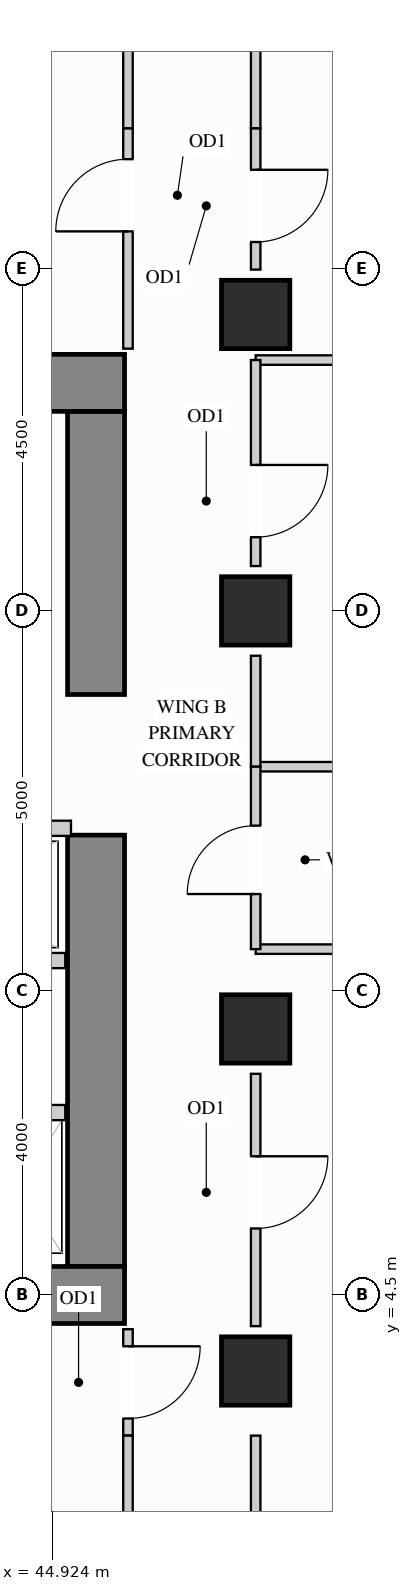
"""IFC4 building model, lengths in metres.
Left out: names, types, materials, properties, quantities, classifications, styles, units other than length and angle.
Written with IfcOpenShell. Run it as: python <this file> out.ifc"""

import sys

from ifc_helpers import new_model, si_unit, direction, frame, frame_2d, origin, origin_2d, place, context, subcontext, project, spatial, rectangle, extrude, source, transform, mapped, element, fill, save


model = new_model("IFC4")
c1 = context("Model", 3, precision=1e-05, world=origin(), true_north=direction((0.0, 1.0)))
c2 = subcontext(c1, "Body", "Model", "MODEL_VIEW")
j1 = project(units=[si_unit("LENGTHUNIT", "METRE"), si_unit("PLANEANGLEUNIT", "RADIAN")], contexts=[c1])
p1 = place(None, origin())
s1 = spatial("IfcSite", under=j1, at=p1, CompositionType="ELEMENT")
p2 = place(p1, origin())
s2 = spatial("IfcBuilding", under=s1, at=p2, CompositionType="ELEMENT")
p3 = place(p2, frame((0.0, 0.0, 81.0)))
s3 = spatial("IfcBuildingStorey", under=s2, at=p3, CompositionType="ELEMENT", Elevation=81.0)
m1 = source(origin(), c2, "Body", "SweptSolid", [
    extrude(rectangle(XDim=0.9, YDim=0.9, at=origin_2d()), origin(), (0.0, 0.0, 1.0), 3.38),
])
for number, where, z_axis, x_axis in (
    (1, (47.6, 13.5, 0.0), (0.0, 0.0, 1.0), (1.0, 0.0, 0.0)),
    (2, (47.6, 3.5, 0.0), (0.0, 0.0, 1.0), (1.0, 0.0, 0.0)),
    (3, (47.6, 8.0, 0.0), (0.0, 0.0, 1.0), (1.0, 0.0, 0.0)),
    (4, (47.6, 17.4, 0.0), (0.0, 0.0, 1.0), (1.0, 0.0, 0.0)),
):
    element("IfcColumn", number, at=place(p3, frame(where, z_axis=z_axis, x_axis=x_axis)), inside=s3, PredefinedType="COLUMN", context=c2, shape_type="MappedRepresentation", body=[
        mapped(m1, transform((0.0, 0.0, 0.0), x_axis=(1.0, 0.0, 0.0), y_axis=(0.0, 1.0, 0.0), z_axis=(0.0, 0.0, 1.0))),
    ])
m2 = source(origin(), c2, "Body", "SweptSolid", [
    extrude(rectangle(XDim=5.675, YDim=0.75, at=frame_2d((2.837, 0.0))), origin(), (0.0, 0.0, 1.0), 3.38),
])
p4 = place(p3, frame((45.5, 4.875, 0.0), z_axis=(0.0, 0.0, 1.0), x_axis=(0.0, 1.0, 0.0)))
e5 = element("IfcWall", 5, at=p4, inside=s3, PredefinedType="SHEAR", context=c2, shape_type="MappedRepresentation", body=[
    mapped(m2, transform((0.0, 0.0, 0.0), x_axis=(1.0, 0.0, 0.0), y_axis=(0.0, 1.0, 0.0), z_axis=(0.0, 0.0, 1.0))),
])
m3 = source(origin(), c2, "Body", "SweptSolid", [
    extrude(rectangle(XDim=3.725, YDim=0.75, at=frame_2d((1.863, 0.0))), origin(), (0.0, 0.0, 1.0), 3.38),
])
p5 = place(p3, frame((45.5, 12.4, 0.0), z_axis=(0.0, 0.0, 1.0), x_axis=(0.0, 1.0, 0.0)))
e6 = element("IfcWall", 6, at=p5, inside=s3, PredefinedType="SHEAR", context=c2, shape_type="MappedRepresentation", body=[
    mapped(m3, transform((0.0, 0.0, 0.0), x_axis=(1.0, 0.0, 0.0), y_axis=(0.0, 1.0, 0.0), z_axis=(0.0, 0.0, 1.0))),
])
m4 = source(origin(), c2, "Body", "SweptSolid", [
    extrude(rectangle(XDim=10.25, YDim=0.75, at=frame_2d((5.125, 0.0))), origin(), (0.0, 0.0, 1.0), 3.38),
])
for number, where, z_axis, x_axis in (
    (7, (35.625, 16.5, 0.0), (0.0, 0.0, 1.0), (1.0, 0.0, 0.0)),
    (8, (35.625, 4.5, 0.0), (0.0, 0.0, 1.0), (1.0, 0.0, 0.0)),
):
    element("IfcWall", number, at=place(p3, frame(where, z_axis=z_axis, x_axis=x_axis)), inside=s3, PredefinedType="SHEAR", context=c2, shape_type="MappedRepresentation", body=[
        mapped(m4, transform((0.0, 0.0, 0.0), x_axis=(1.0, 0.0, 0.0), y_axis=(0.0, 1.0, 0.0), z_axis=(0.0, 0.0, 1.0))),
    ])
m5 = source(origin(), c2, "Body", "SweptSolid", [
    extrude(rectangle(XDim=8.048, YDim=0.125, at=frame_2d((4.024, 0.0))), origin(), (0.0, 0.0, 1.0), 3.365),
])
for number, where, z_axis, x_axis in (
    (9, (47.6, 11.45, 0.0), (0.0, 0.0, 1.0), (1.0, 0.0, 0.0)),
    (10, (47.6, 16.8, 0.0), (0.0, 0.0, 1.0), (1.0, 0.0, 0.0)),
    (11, (47.6, 9.05, 0.0), (0.0, 0.0, 1.0), (1.0, 0.0, 0.0)),
):
    element("IfcWall", number, at=place(p3, frame(where, z_axis=z_axis, x_axis=x_axis)), inside=s3, PredefinedType="PARTITIONING", context=c2, shape_type="MappedRepresentation", body=[
        mapped(m5, transform((0.0, 0.0, 0.0), x_axis=(1.0, 0.0, 0.0), y_axis=(0.0, 1.0, 0.0), z_axis=(0.0, 0.0, 1.0))),
    ])
p6 = place(p3, frame((47.6, 4.09, 0.0), z_axis=(0.0, 0.0, 1.0), x_axis=(0.0, 1.0, 0.0)))
e12 = element("IfcWall", 12, at=p6, inside=s3, PredefinedType="PARTITIONING", context=c2, shape_type="SweptSolid", body=[
    extrude(rectangle(XDim=3.32, YDim=0.125, at=frame_2d((1.66, 0.0))), origin(), (0.0, 0.0, 1.0), 2.677),
])
p7 = place(p6, frame((1.285, 0.0, 0.0)))
e13 = element("IfcOpeningElement", 13, at=p7, cuts=e12, PredefinedType="OPENING", context=c2, shape_type="SweptSolid", body=[
    extrude(rectangle(XDim=0.95, YDim=2.15, at=frame_2d((0.475, 1.075))), frame((0.0, 0.073, 0.0), z_axis=(0.0, -1.0, 0.0), x_axis=(1.0, 0.0, 0.0)), (0.0, 0.0, 1.0), 0.145),
])
m6 = source(origin(), c2, "Body", "SweptSolid", [
    extrude(rectangle(XDim=1.46, YDim=0.125, at=frame_2d((0.73, 0.0))), origin(), (0.0, 0.0, 1.0), 2.677),
])
for number, where, z_axis, x_axis in (
    (14, (47.6, 1.19, 0.0), (0.0, 0.0, 1.0), (0.0, 1.0, 0.0)),
    (15, (47.6, 11.45, 0.0), (0.0, 0.0, 1.0), (0.0, 1.0, 0.0)),
):
    element("IfcWall", number, at=place(p3, frame(where, z_axis=z_axis, x_axis=x_axis)), inside=s3, PredefinedType="PARTITIONING", context=c2, shape_type="MappedRepresentation", body=[
        mapped(m6, transform((0.0, 0.0, 0.0), x_axis=(1.0, 0.0, 0.0), y_axis=(0.0, 1.0, 0.0), z_axis=(0.0, 0.0, 1.0))),
    ])
p8 = place(p3, frame((47.6, 14.09, 0.0), z_axis=(0.0, 0.0, 1.0), x_axis=(0.0, 1.0, 0.0)))
e16 = element("IfcWall", 16, at=p8, inside=s3, PredefinedType="PARTITIONING", context=c2, shape_type="SweptSolid", body=[
    extrude(rectangle(XDim=2.71, YDim=0.125, at=frame_2d((1.355, 0.0))), origin(), (0.0, 0.0, 1.0), 2.677),
])
p9 = place(p8, frame((0.38, 0.0, 0.0)))
e17 = element("IfcOpeningElement", 17, at=p9, cuts=e16, PredefinedType="OPENING", context=c2, shape_type="SweptSolid", body=[
    extrude(rectangle(XDim=0.95, YDim=2.15, at=frame_2d((0.475, 1.075))), frame((0.0, 0.073, 0.0), z_axis=(0.0, -1.0, 0.0), x_axis=(1.0, 0.0, 0.0)), (0.0, 0.0, 1.0), 0.145),
])
p10 = place(p3, frame((47.6, 17.99, 0.0), z_axis=(0.0, 0.0, 1.0), x_axis=(0.0, 1.0, 0.0)))
e18 = element("IfcWall", 18, at=p10, inside=s3, PredefinedType="PARTITIONING", context=c2, shape_type="SweptSolid", body=[
    extrude(rectangle(XDim=1.86, YDim=0.125, at=frame_2d((0.93, 0.0))), origin(), (0.0, 0.0, 1.0), 2.677),
])
p11 = place(p10, frame((0.363, 0.0, 0.0)))
e19 = element("IfcOpeningElement", 19, at=p11, cuts=e18, PredefinedType="OPENING", context=c2, shape_type="SweptSolid", body=[
    extrude(rectangle(XDim=0.95, YDim=2.15, at=frame_2d((0.475, 1.075))), frame((0.0, 0.073, 0.0), z_axis=(0.0, -1.0, 0.0), x_axis=(1.0, 0.0, 0.0)), (0.0, 0.0, 1.0), 0.145),
])
p12 = place(p3, frame((47.6, 19.85, 0.0), z_axis=(0.0, 0.0, 1.0), x_axis=(0.0, 1.0, 0.0)))
e20 = element("IfcWall", 20, at=p12, inside=s3, PredefinedType="PARTITIONING", context=c2, shape_type="MappedRepresentation", body=[
    mapped(m6, transform((0.0, 0.0, 0.0), x_axis=(1.0, 0.0, 0.0), y_axis=(0.0, 1.0, 0.0), z_axis=(0.0, 0.0, 1.0))),
])
p13 = place(p3, frame((47.6, 9.05, 0.0), z_axis=(0.0, 0.0, 1.0), x_axis=(0.0, 1.0, 0.0)))
e21 = element("IfcWall", 21, at=p13, inside=s3, PredefinedType="PARTITIONING", context=c2, shape_type="SweptSolid", body=[
    extrude(rectangle(XDim=2.4, YDim=0.125, at=frame_2d((1.2, 0.0))), origin(), (0.0, 0.0, 1.0), 2.677),
])
p14 = place(p13, frame((0.725, 0.0, 0.0)))
e22 = element("IfcOpeningElement", 22, at=p14, cuts=e21, PredefinedType="OPENING", context=c2, shape_type="SweptSolid", body=[
    extrude(rectangle(XDim=0.9, YDim=2.15, at=frame_2d((0.45, 1.075))), frame((0.0, 0.073, 0.0), z_axis=(0.0, -1.0, 0.0), x_axis=(1.0, 0.0, 0.0)), (0.0, 0.0, 1.0), 0.145),
])
p15 = place(p3, frame((45.92, 16.95, 0.0), z_axis=(0.0, 0.0, 1.0), x_axis=(0.0, 1.0, 0.0)))
e23 = element("IfcWall", 23, at=p15, inside=s3, PredefinedType="PARTITIONING", context=c2, shape_type="SweptSolid", body=[
    extrude(rectangle(XDim=2.9, YDim=0.125, at=frame_2d((1.45, 0.0))), origin(), (0.0, 0.0, 1.0), 3.365),
])
p16 = place(p15, frame((1.543, 0.0, 0.0)))
e24 = element("IfcOpeningElement", 24, at=p16, cuts=e23, PredefinedType="OPENING", context=c2, shape_type="SweptSolid", body=[
    extrude(rectangle(XDim=0.95, YDim=2.15, at=frame_2d((0.475, 1.075))), frame((0.0, 0.073, 0.0), z_axis=(0.0, -1.0, 0.0), x_axis=(1.0, 0.0, 0.0)), (0.0, 0.0, 1.0), 0.145),
])
m7 = source(origin(), c2, "Body", "SweptSolid", [
    extrude(rectangle(XDim=2.298, YDim=0.125, at=frame_2d((1.149, 0.0))), origin(), (0.0, 0.0, 1.0), 3.365),
])
p17 = place(p3, frame((45.92, 19.85, 0.0), z_axis=(0.0, 0.0, 1.0), x_axis=(0.0, 1.0, 0.0)))
e25 = element("IfcWall", 25, at=p17, inside=s3, PredefinedType="PARTITIONING", context=c2, shape_type="MappedRepresentation", body=[
    mapped(m7, transform((0.0, 0.0, 0.0), x_axis=(1.0, 0.0, 0.0), y_axis=(0.0, 1.0, 0.0), z_axis=(0.0, 0.0, 1.0))),
])
p18 = place(p3, frame((45.92, 2.65, 0.0), z_axis=(0.0, 0.0, 1.0), x_axis=(0.0, 1.0, 0.0)))
e26 = element("IfcWall", 26, at=p18, inside=s3, PredefinedType="PARTITIONING", context=c2, shape_type="SweptSolid", body=[
    extrude(rectangle(XDim=1.4, YDim=0.125, at=frame_2d((0.7, 0.0))), origin(), (0.0, 0.0, 1.0), 3.365),
])
p19 = place(p18, frame((0.225, 0.0, 0.0)))
e27 = element("IfcOpeningElement", 27, at=p19, cuts=e26, PredefinedType="OPENING", context=c2, shape_type="SweptSolid", body=[
    extrude(rectangle(XDim=0.95, YDim=2.15, at=frame_2d((0.475, 1.075))), frame((0.0, 0.073, 0.0), z_axis=(0.0, -1.0, 0.0), x_axis=(1.0, 0.0, 0.0)), (0.0, 0.0, 1.0), 0.145),
])
p20 = place(p3, frame((45.92, 0.352, 0.0), z_axis=(0.0, 0.0, 1.0), x_axis=(0.0, 1.0, 0.0)))
e28 = element("IfcWall", 28, at=p20, inside=s3, PredefinedType="PARTITIONING", context=c2, shape_type="MappedRepresentation", body=[
    mapped(m7, transform((0.0, 0.0, 0.0), x_axis=(1.0, 0.0, 0.0), y_axis=(0.0, 1.0, 0.0), z_axis=(0.0, 0.0, 1.0))),
])
m8 = source(origin(), c2, "Body", "SweptSolid", [
    extrude(rectangle(XDim=1.245, YDim=0.2, at=frame_2d((0.623, 0.0))), origin(), (0.0, 0.0, 1.0), 3.365),
])
p21 = place(p3, frame((43.85, 6.9, 0.0), z_axis=(0.0, 0.0, 1.0), x_axis=(1.0, 0.0, 0.0)))
e29 = element("IfcWall", 29, at=p21, inside=s3, PredefinedType="PARTITIONING", context=c2, shape_type="MappedRepresentation", body=[
    mapped(m8, transform((0.0, 0.0, 0.0), x_axis=(1.0, 0.0, 0.0), y_axis=(0.0, 1.0, 0.0), z_axis=(0.0, 0.0, 1.0))),
])
m9 = source(origin(), c2, "Body", "SweptSolid", [
    extrude(rectangle(XDim=3.49, YDim=0.2, at=frame_2d((1.745, 0.0))), origin(), (0.0, 0.0, 1.0), 3.365),
])
p22 = place(p3, frame((41.68, 10.64, 0.0), z_axis=(0.0, 0.0, 1.0), x_axis=(1.0, 0.0, 0.0)))
e30 = element("IfcWall", 30, at=p22, inside=s3, PredefinedType="PARTITIONING", context=c2, shape_type="MappedRepresentation", body=[
    mapped(m9, transform((0.0, 0.0, 0.0), x_axis=(1.0, 0.0, 0.0), y_axis=(0.0, 1.0, 0.0), z_axis=(0.0, 0.0, 1.0))),
])
m10 = source(origin(), c2, "Body", "SweptSolid", [
    extrude(rectangle(XDim=3.415, YDim=0.2, at=frame_2d((1.708, 0.0))), origin(), (0.0, 0.0, 1.0), 3.365),
])
p23 = place(p3, frame((41.68, 8.9, 0.0), z_axis=(0.0, 0.0, 1.0), x_axis=(1.0, 0.0, 0.0)))
e31 = element("IfcWall", 31, at=p23, inside=s3, PredefinedType="PARTITIONING", context=c2, shape_type="MappedRepresentation", body=[
    mapped(m10, transform((0.0, 0.0, 0.0), x_axis=(1.0, 0.0, 0.0), y_axis=(0.0, 1.0, 0.0), z_axis=(0.0, 0.0, 1.0))),
])
m11 = source(origin(), c2, "Body", "SweptSolid", [
    extrude(rectangle(XDim=0.95, YDim=2.15, at=frame_2d((0.475, 1.075))), frame((0.0, 0.025, 0.0), z_axis=(0.0, -1.0, 0.0), x_axis=(1.0, 0.0, 0.0)), (0.0, 0.0, 1.0), 0.05),
])
p24 = place(p16, origin())
e32 = element("IfcDoor", 32, at=p24, inside=s3, OperationType="SINGLE_SWING_LEFT", PredefinedType="DOOR", context=c2, shape_type="MappedRepresentation", body=[
    mapped(m11, transform((0.0, 0.0, 0.0), x_axis=(1.0, 0.0, 0.0), y_axis=(0.0, 1.0, 0.0), z_axis=(0.0, 0.0, 1.0))),
])
fill(e24, e32)
p25 = place(p19, origin())
e33 = element("IfcDoor", 33, at=p25, inside=s3, OperationType="SINGLE_SWING_RIGHT", PredefinedType="DOOR", context=c2, shape_type="MappedRepresentation", body=[
    mapped(m11, transform((0.0, 0.0, 0.0), x_axis=(1.0, 0.0, 0.0), y_axis=(0.0, 1.0, 0.0), z_axis=(0.0, 0.0, 1.0))),
])
fill(e27, e33)
p26 = place(p7, origin())
e34 = element("IfcDoor", 34, at=p26, inside=s3, OperationType="SINGLE_SWING_RIGHT", PredefinedType="DOOR", context=c2, shape_type="MappedRepresentation", body=[
    mapped(m11, transform((0.0, 0.0, 0.0), x_axis=(1.0, 0.0, 0.0), y_axis=(0.0, 1.0, 0.0), z_axis=(0.0, 0.0, 1.0))),
])
fill(e13, e34)
p27 = place(p9, origin())
e35 = element("IfcDoor", 35, at=p27, inside=s3, OperationType="SINGLE_SWING_RIGHT", PredefinedType="DOOR", context=c2, shape_type="MappedRepresentation", body=[
    mapped(m11, transform((0.0, 0.0, 0.0), x_axis=(1.0, 0.0, 0.0), y_axis=(0.0, 1.0, 0.0), z_axis=(0.0, 0.0, 1.0))),
])
fill(e17, e35)
p28 = place(p11, origin())
e36 = element("IfcDoor", 36, at=p28, inside=s3, OperationType="SINGLE_SWING_RIGHT", PredefinedType="DOOR", context=c2, shape_type="MappedRepresentation", body=[
    mapped(m11, transform((0.0, 0.0, 0.0), x_axis=(1.0, 0.0, 0.0), y_axis=(0.0, 1.0, 0.0), z_axis=(0.0, 0.0, 1.0))),
])
fill(e19, e36)
m12 = source(origin(), c2, "Body", "SweptSolid", [
    extrude(rectangle(XDim=0.9, YDim=2.15, at=frame_2d((0.45, 1.075))), frame((0.0, 0.025, 0.0), z_axis=(0.0, -1.0, 0.0), x_axis=(1.0, 0.0, 0.0)), (0.0, 0.0, 1.0), 0.05),
])
p29 = place(p14, origin())
e37 = element("IfcDoor", 37, at=p29, inside=s3, OperationType="SINGLE_SWING_LEFT", PredefinedType="DOOR", context=c2, shape_type="MappedRepresentation", body=[
    mapped(m12, transform((0.0, 0.0, 0.0), x_axis=(1.0, 0.0, 0.0), y_axis=(0.0, 1.0, 0.0), z_axis=(0.0, 0.0, 1.0))),
])
fill(e22, e37)
save(model, sys.argv[1])
